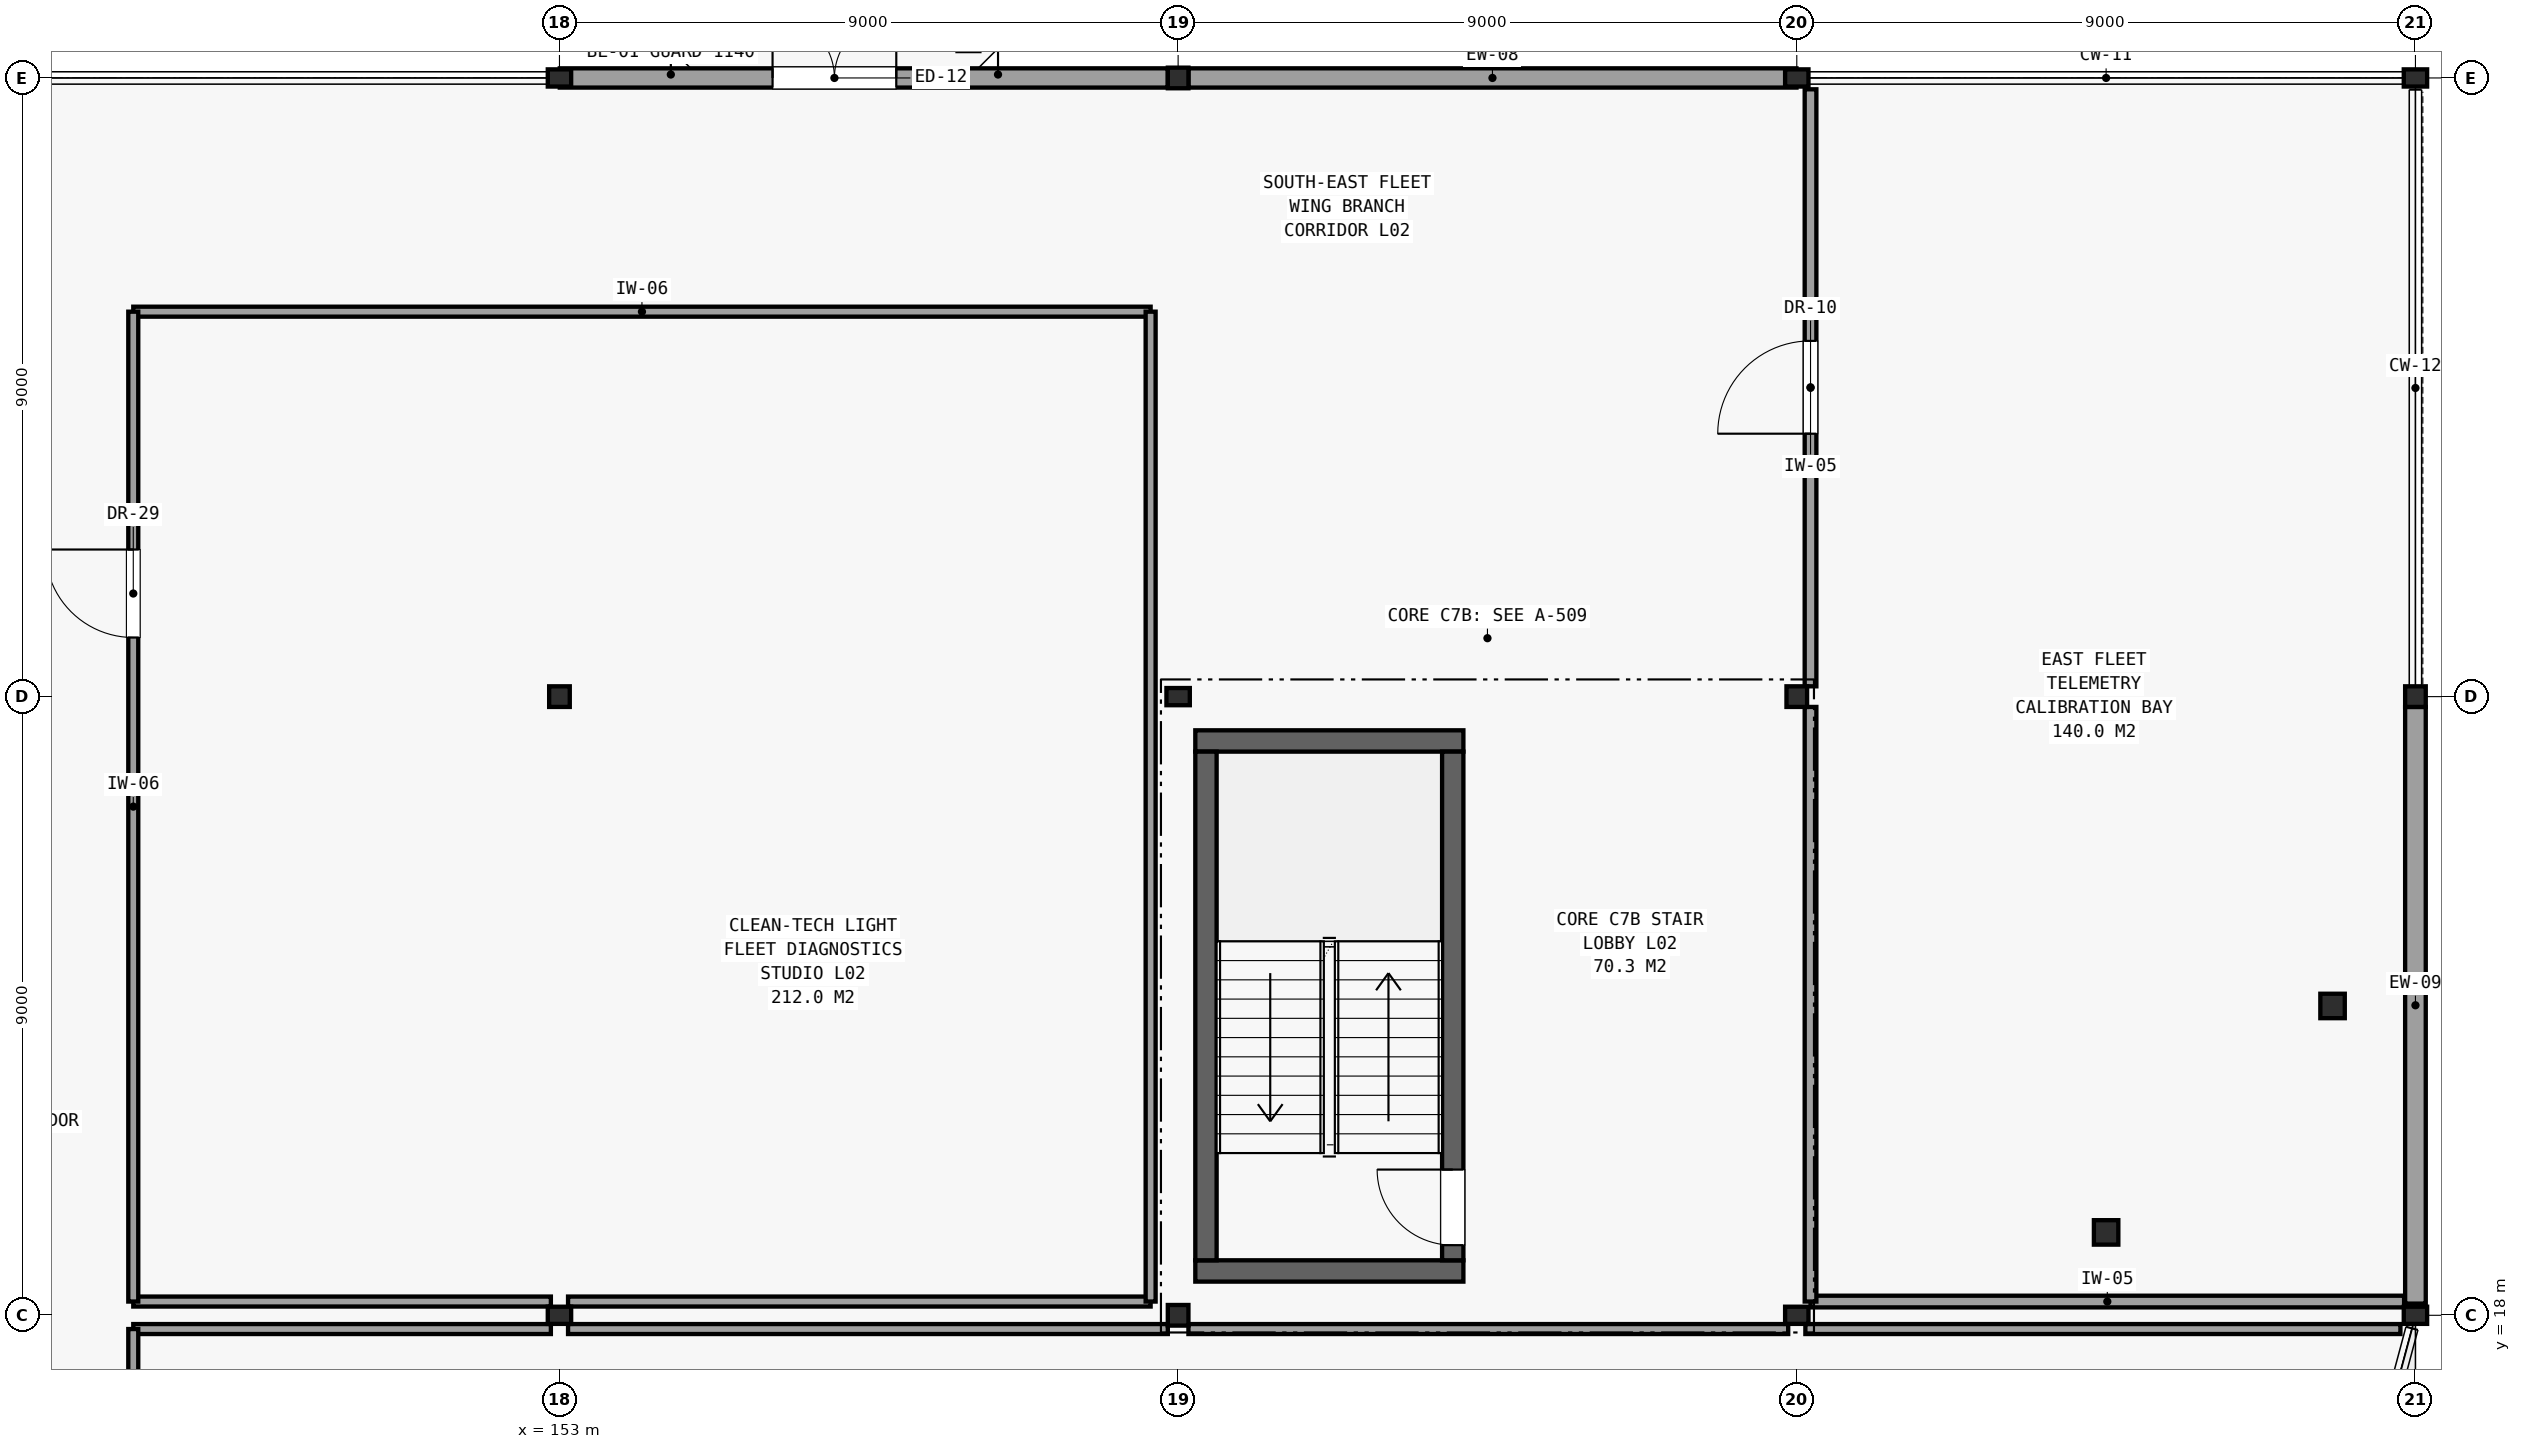
"""IFC4 building model, lengths in metres.
Left out: names, types, materials, properties, quantities, classifications, styles, units other than length and angle.
Written with IfcOpenShell. Run it as: python <this file> out.ifc"""

import sys

from ifc_helpers import new_model, si_unit, direction, frame, frame_2d, origin, origin_2d, place, context, subcontext, project, spatial, rectangle, hollow_rectangle, hollow_circle, i_section, extrude, element, fill, save


model = new_model("IFC4")
c1 = context("Model", 3, precision=1e-05, world=origin(), true_north=direction((0.0, 1.0)))
c2 = subcontext(c1, "Body", "Model", "MODEL_VIEW")
j1 = project(units=[si_unit("LENGTHUNIT", "METRE"), si_unit("PLANEANGLEUNIT", "RADIAN")], contexts=[c1])
p1 = place(None, origin())
s1 = spatial("IfcSite", under=j1, at=p1, CompositionType="ELEMENT")
p2 = place(p1, origin())
s2 = spatial("IfcBuilding", under=s1, at=p2, CompositionType="ELEMENT")
p3 = place(p2, frame((0.0, 0.0, 9.3)))
s3 = spatial("IfcBuildingStorey", under=s2, at=p3, CompositionType="ELEMENT", Elevation=9.3)
p4 = place(p3, frame((153.0, 18.0, 0.0), z_axis=(0.0, 0.0, 1.0), x_axis=(1.0, 0.0, 0.0)))
e1 = element("IfcColumn", 1, at=p4, inside=s3, PredefinedType="COLUMN", context=c2, shape_type="SweptSolid", body=[
    extrude(i_section(OverallWidth=0.25, OverallDepth=0.34, WebThickness=0.009, FlangeThickness=0.014, FilletRadius=0.01, at=origin_2d()), origin(), (0.0, 0.0, 1.0), 4.2),
])
p5 = place(p3, frame((153.0, 27.0, 0.0), z_axis=(0.0, 0.0, 1.0), x_axis=(1.0, 0.0, 0.0)))
e2 = element("IfcColumn", 2, at=p5, inside=s3, PredefinedType="COLUMN", context=c2, shape_type="SweptSolid", body=[
    extrude(hollow_rectangle(XDim=0.3, YDim=0.3, WallThickness=0.012, at=origin_2d()), origin(), (0.0, 0.0, 1.0), 4.2),
])
p6 = place(p3, frame((153.0, 36.0, 0.0), z_axis=(0.0, 0.0, 1.0), x_axis=(1.0, 0.0, 0.0)))
e3 = element("IfcColumn", 3, at=p6, inside=s3, PredefinedType="COLUMN", context=c2, shape_type="SweptSolid", body=[
    extrude(i_section(OverallWidth=0.25, OverallDepth=0.34, WebThickness=0.009, FlangeThickness=0.014, FilletRadius=0.01, at=origin_2d()), origin(), (0.0, 0.0, 1.0), 4.2),
])
p7 = place(p3, frame((162.0, 18.0, 0.0), z_axis=(0.0, 0.0, 1.0), x_axis=(1.0, 0.0, 0.0)))
e4 = element("IfcColumn", 4, at=p7, inside=s3, PredefinedType="COLUMN", context=c2, shape_type="SweptSolid", body=[
    extrude(hollow_rectangle(XDim=0.3, YDim=0.3, WallThickness=0.012, at=origin_2d()), origin(), (0.0, 0.0, 1.0), 4.2),
])
p8 = place(p3, frame((162.0, 27.0, 0.0), z_axis=(0.0, 0.0, 1.0), x_axis=(1.0, 0.0, 0.0)))
e5 = element("IfcColumn", 5, at=p8, inside=s3, PredefinedType="COLUMN", context=c2, shape_type="SweptSolid", body=[
    extrude(i_section(OverallWidth=0.25, OverallDepth=0.34, WebThickness=0.009, FlangeThickness=0.014, FilletRadius=0.01, at=origin_2d()), origin(), (0.0, 0.0, 1.0), 4.2),
])
p9 = place(p3, frame((162.0, 36.0, 0.0), z_axis=(0.0, 0.0, 1.0), x_axis=(1.0, 0.0, 0.0)))
e6 = element("IfcColumn", 6, at=p9, inside=s3, PredefinedType="COLUMN", context=c2, shape_type="SweptSolid", body=[
    extrude(hollow_rectangle(XDim=0.3, YDim=0.3, WallThickness=0.012, at=origin_2d()), origin(), (0.0, 0.0, 1.0), 4.2),
])
p10 = place(p3, frame((171.0, 18.0, 0.0), z_axis=(0.0, 0.0, 1.0), x_axis=(1.0, 0.0, 0.0)))
e7 = element("IfcColumn", 7, at=p10, inside=s3, PredefinedType="COLUMN", context=c2, shape_type="SweptSolid", body=[
    extrude(i_section(OverallWidth=0.25, OverallDepth=0.34, WebThickness=0.009, FlangeThickness=0.014, FilletRadius=0.01, at=origin_2d()), origin(), (0.0, 0.0, 1.0), 4.2),
])
p11 = place(p3, frame((171.0, 27.0, 0.0), z_axis=(0.0, 0.0, 1.0), x_axis=(1.0, 0.0, 0.0)))
e8 = element("IfcColumn", 8, at=p11, inside=s3, PredefinedType="COLUMN", context=c2, shape_type="SweptSolid", body=[
    extrude(hollow_rectangle(XDim=0.3, YDim=0.3, WallThickness=0.012, at=origin_2d()), origin(), (0.0, 0.0, 1.0), 4.2),
])
p12 = place(p3, frame((171.0, 36.0, 0.0), z_axis=(0.0, 0.0, 1.0), x_axis=(1.0, 0.0, 0.0)))
e9 = element("IfcColumn", 9, at=p12, inside=s3, PredefinedType="COLUMN", context=c2, shape_type="SweptSolid", body=[
    extrude(i_section(OverallWidth=0.25, OverallDepth=0.34, WebThickness=0.009, FlangeThickness=0.014, FilletRadius=0.01, at=origin_2d()), origin(), (0.0, 0.0, 1.0), 4.2),
])
for number, where, z_axis, x_axis in (
    (10, (175.5, 19.206, 0.0), (0.0, 0.0, 1.0), (1.0, 0.0, 0.0)),
    (11, (178.794, 22.5, 0.0), (0.0, 0.0, 1.0), (1.0, 0.0, 0.0)),
):
    element("IfcColumn", number, at=place(p3, frame(where, z_axis=z_axis, x_axis=x_axis)), inside=s3, PredefinedType="COLUMN", context=c2, shape_type="SweptSolid", body=[
        extrude(hollow_circle(Radius=0.178, WallThickness=0.013, at=origin_2d()), origin(), (0.0, 0.0, 1.0), 4.2),
    ])
p13 = place(p3, frame((180.0, 18.0, 0.0), z_axis=(0.0, 0.0, 1.0), x_axis=(1.0, 0.0, 0.0)))
e12 = element("IfcColumn", 12, at=p13, inside=s3, PredefinedType="COLUMN", context=c2, shape_type="SweptSolid", body=[
    extrude(i_section(OverallWidth=0.25, OverallDepth=0.34, WebThickness=0.009, FlangeThickness=0.014, FilletRadius=0.01, at=origin_2d()), origin(), (0.0, 0.0, 1.0), 4.14),
])
p14 = place(p3, frame((180.0, 27.0, 0.0), z_axis=(0.0, 0.0, 1.0), x_axis=(1.0, 0.0, 0.0)))
e13 = element("IfcColumn", 13, at=p14, inside=s3, PredefinedType="COLUMN", context=c2, shape_type="SweptSolid", body=[
    extrude(hollow_rectangle(XDim=0.3, YDim=0.3, WallThickness=0.012, at=origin_2d()), origin(), (0.0, 0.0, 1.0), 4.2),
])
p15 = place(p3, frame((180.0, 36.0, 0.0), z_axis=(0.0, 0.0, 1.0), x_axis=(1.0, 0.0, 0.0)))
e14 = element("IfcColumn", 14, at=p15, inside=s3, PredefinedType="COLUMN", context=c2, shape_type="SweptSolid", body=[
    extrude(i_section(OverallWidth=0.25, OverallDepth=0.34, WebThickness=0.009, FlangeThickness=0.014, FilletRadius=0.01, at=origin_2d()), origin(), (0.0, 0.0, 1.0), 4.2),
])
p16 = place(p3, frame((180.0, 18.17, 0.0), z_axis=(0.0, 0.0, 1.0), x_axis=(0.0, 1.0, 0.0)))
e15 = element("IfcWall", 15, at=p16, inside=s3, PredefinedType="SOLIDWALL", context=c2, shape_type="SweptSolid", body=[
    extrude(rectangle(XDim=8.68, YDim=0.3, at=frame_2d((4.34, 0.0))), origin(), (0.0, 0.0, 1.0), 3.29),
])
p17 = place(p3, frame((170.996, 36.0, 0.0), z_axis=(0.0, 0.0, 1.0), x_axis=(-1.0, 0.0, 0.0)))
e16 = element("IfcWall", 16, at=p17, inside=s3, PredefinedType="SOLIDWALL", context=c2, shape_type="SweptSolid", body=[
    extrude(rectangle(XDim=8.846, YDim=0.28, at=frame_2d((4.423, 0.0))), origin(), (0.0, 0.0, 1.0), 3.3),
])
p18 = place(p3, frame((161.85, 36.0, 0.0), z_axis=(0.0, 0.0, 1.0), x_axis=(-1.0, 0.0, 0.0)))
e17 = element("IfcWall", 17, at=p18, inside=s3, PredefinedType="SOLIDWALL", context=c2, shape_type="SweptSolid", body=[
    extrude(rectangle(XDim=8.846, YDim=0.28, at=frame_2d((4.423, 0.0))), origin(), (0.0, 0.0, 1.0), 3.3),
])
p19 = place(p18, frame((5.75, 0.0, 0.0), z_axis=(0.0, 0.0, 1.0), x_axis=(-1.0, 0.0, 0.0)))
e18 = element("IfcOpeningElement", 18, at=p19, cuts=e17, PredefinedType="OPENING", context=c2, shape_type="SweptSolid", body=[
    extrude(rectangle(XDim=1.8, YDim=2.2, at=frame_2d((0.9, 1.1))), frame((0.0, 0.151, 0.0), z_axis=(0.0, -1.0, 0.0), x_axis=(1.0, 0.0, 0.0)), (0.0, 0.0, 1.0), 0.302),
])
for number, where, z_axis, x_axis in (
    (19, (162.25, 18.645, 0.0), (0.0, 0.0, 1.0), (1.0, 0.0, 0.0)),
    (20, (162.25, 26.355, 0.0), (0.0, 0.0, 1.0), (1.0, 0.0, 0.0)),
):
    element("IfcWall", number, at=place(p3, frame(where, z_axis=z_axis, x_axis=x_axis)), inside=s3, PredefinedType="SHEAR", context=c2, shape_type="SweptSolid", body=[
        extrude(rectangle(XDim=3.9, YDim=0.31, at=frame_2d((1.95, 0.0))), origin(), (0.0, 0.0, 1.0), 3.95),
    ])
p20 = place(p3, frame((162.405, 18.8, 0.0), z_axis=(0.0, 0.0, 1.0), x_axis=(0.0, 1.0, 0.0)))
e21 = element("IfcWall", 21, at=p20, inside=s3, PredefinedType="SHEAR", context=c2, shape_type="SweptSolid", body=[
    extrude(rectangle(XDim=7.4, YDim=0.31, at=frame_2d((3.7, 0.0))), origin(), (0.0, 0.0, 1.0), 3.95),
])
p21 = place(p3, frame((165.995, 18.8, 0.0), z_axis=(0.0, 0.0, 1.0), x_axis=(0.0, 1.0, 0.0)))
e22 = element("IfcWall", 22, at=p21, inside=s3, PredefinedType="SHEAR", context=c2, shape_type="SweptSolid", body=[
    extrude(rectangle(XDim=7.4, YDim=0.31, at=frame_2d((3.7, 0.0))), origin(), (0.0, 0.0, 1.0), 3.95),
])
p22 = place(p21, frame((0.22, 0.0, 0.0)))
e23 = element("IfcOpeningElement", 23, at=p22, cuts=e22, PredefinedType="OPENING", context=c2, shape_type="SweptSolid", body=[
    extrude(rectangle(XDim=1.1, YDim=2.15, at=frame_2d((0.55, 1.075))), frame((0.0, 0.166, 0.0), z_axis=(0.0, -1.0, 0.0), x_axis=(1.0, 0.0, 0.0)), (0.0, 0.0, 1.0), 0.332),
])
p23 = place(p3, frame((146.8, 18.2, 0.0), z_axis=(0.0, 0.0, 1.0), x_axis=(1.0, 0.0, 0.0)))
e24 = element("IfcWall", 24, at=p23, inside=s3, PredefinedType="PARTITIONING", context=c2, shape_type="SweptSolid", body=[
    extrude(rectangle(XDim=6.075, YDim=0.145, at=frame_2d((3.038, 0.0))), origin(), (0.0, 0.0, 1.0), 3.29),
])
p24 = place(p3, frame((153.125, 18.2, 0.0), z_axis=(0.0, 0.0, 1.0), x_axis=(1.0, 0.0, 0.0)))
e25 = element("IfcWall", 25, at=p24, inside=s3, PredefinedType="PARTITIONING", context=c2, shape_type="SweptSolid", body=[
    extrude(rectangle(XDim=8.475, YDim=0.145, at=frame_2d((4.238, 0.0))), origin(), (0.0, 0.0, 1.0), 3.29),
])
p25 = place(p3, frame((146.8, 32.6, 0.0), z_axis=(0.0, 0.0, 1.0), x_axis=(1.0, 0.0, 0.0)))
e26 = element("IfcWall", 26, at=p25, inside=s3, PredefinedType="PARTITIONING", context=c2, shape_type="SweptSolid", body=[
    extrude(rectangle(XDim=14.8, YDim=0.145, at=frame_2d((7.4, 0.0))), origin(), (0.0, 0.0, 1.0), 3.3),
])
p26 = place(p3, frame((146.8, 18.2, 0.0), z_axis=(0.0, 0.0, 1.0), x_axis=(0.0, 1.0, 0.0)))
e27 = element("IfcWall", 27, at=p26, inside=s3, PredefinedType="PARTITIONING", context=c2, shape_type="SweptSolid", body=[
    extrude(rectangle(XDim=14.4, YDim=0.145, at=frame_2d((7.2, 0.0))), origin(), (0.0, 0.0, 1.0), 3.34),
])
p27 = place(p26, frame((9.66, 0.0, 0.0)))
e28 = element("IfcOpeningElement", 28, at=p27, cuts=e27, PredefinedType="OPENING", context=c2, shape_type="SweptSolid", body=[
    extrude(rectangle(XDim=1.28, YDim=2.3, at=frame_2d((0.64, 1.15))), frame((0.0, 0.083, 0.0), z_axis=(0.0, -1.0, 0.0), x_axis=(1.0, 0.0, 0.0)), (0.0, 0.0, 1.0), 0.167),
])
p28 = place(p3, frame((161.6, 18.2, 0.0), z_axis=(0.0, 0.0, 1.0), x_axis=(0.0, 1.0, 0.0)))
e29 = element("IfcWall", 29, at=p28, inside=s3, PredefinedType="PARTITIONING", context=c2, shape_type="SweptSolid", body=[
    extrude(rectangle(XDim=14.4, YDim=0.145, at=frame_2d((7.2, 0.0))), origin(), (0.0, 0.0, 1.0), 3.34),
])
p29 = place(p3, frame((171.2, 18.2, 0.0), z_axis=(0.0, 0.0, 1.0), x_axis=(1.0, 0.0, 0.0)))
e30 = element("IfcWall", 30, at=p29, inside=s3, PredefinedType="PARTITIONING", context=c2, shape_type="SweptSolid", body=[
    extrude(rectangle(XDim=8.635, YDim=0.17, at=frame_2d((4.317, 0.0))), origin(), (0.0, 0.0, 1.0), 3.29),
])
p30 = place(p3, frame((171.2, 18.2, 0.0), z_axis=(0.0, 0.0, 1.0), x_axis=(0.0, 1.0, 0.0)))
e31 = element("IfcWall", 31, at=p30, inside=s3, PredefinedType="PARTITIONING", context=c2, shape_type="SweptSolid", body=[
    extrude(rectangle(XDim=8.65, YDim=0.17, at=frame_2d((4.325, 0.0))), origin(), (0.0, 0.0, 1.0), 3.29),
])
p31 = place(p3, frame((171.2, 27.15, 0.0), z_axis=(0.0, 0.0, 1.0), x_axis=(0.0, 1.0, 0.0)))
e32 = element("IfcWall", 32, at=p31, inside=s3, PredefinedType="PARTITIONING", context=c2, shape_type="SweptSolid", body=[
    extrude(rectangle(XDim=8.685, YDim=0.17, at=frame_2d((4.343, 0.0))), origin(), (0.0, 0.0, 1.0), 3.3),
])
p32 = place(p31, frame((3.675, 0.0, 0.0)))
e33 = element("IfcOpeningElement", 33, at=p32, cuts=e32, PredefinedType="OPENING", context=c2, shape_type="SweptSolid", body=[
    extrude(rectangle(XDim=1.35, YDim=2.25, at=frame_2d((0.675, 1.125))), frame((0.0, 0.096, 0.0), z_axis=(0.0, -1.0, 0.0), x_axis=(1.0, 0.0, 0.0)), (0.0, 0.0, 1.0), 0.192),
])
p33 = place(p3, frame((146.8, 17.8, 0.0), z_axis=(0.0, 0.0, 1.0), x_axis=(1.0, 0.0, 0.0)))
e34 = element("IfcWall", 34, at=p33, inside=s3, PredefinedType="PARTITIONING", context=c2, shape_type="SweptSolid", body=[
    extrude(rectangle(XDim=6.075, YDim=0.145, at=frame_2d((3.038, 0.0))), origin(), (0.0, 0.0, 1.0), 3.29),
])
for number, where, z_axis, x_axis in (
    (35, (153.125, 17.8, 0.0), (0.0, 0.0, 1.0), (1.0, 0.0, 0.0)),
    (36, (162.15, 17.8, 0.0), (0.0, 0.0, 1.0), (1.0, 0.0, 0.0)),
):
    element("IfcWall", number, at=place(p3, frame(where, z_axis=z_axis, x_axis=x_axis)), inside=s3, PredefinedType="PARTITIONING", context=c2, shape_type="SweptSolid", body=[
        extrude(rectangle(XDim=8.725, YDim=0.145, at=frame_2d((4.363, 0.0))), origin(), (0.0, 0.0, 1.0), 3.29),
    ])
p34 = place(p3, frame((171.125, 17.8, 0.0), z_axis=(0.0, 0.0, 1.0), x_axis=(1.0, 0.0, 0.0)))
e37 = element("IfcWall", 37, at=p34, inside=s3, PredefinedType="PARTITIONING", context=c2, shape_type="SweptSolid", body=[
    extrude(rectangle(XDim=8.656, YDim=0.145, at=frame_2d((4.328, 0.0))), origin(), (0.0, 0.0, 1.0), 3.29),
])
p35 = place(p3, frame((146.8, 9.165, 0.0), z_axis=(0.0, 0.0, 1.0), x_axis=(0.0, 1.0, 0.0)))
e38 = element("IfcWall", 38, at=p35, inside=s3, PredefinedType="PARTITIONING", context=c2, shape_type="SweptSolid", body=[
    extrude(rectangle(XDim=8.635, YDim=0.145, at=frame_2d((4.317, 0.0))), origin(), (0.0, 0.0, 1.0), 3.34),
])
p36 = place(p35, frame((3.625, 0.0, 0.0)))
e39 = element("IfcOpeningElement", 39, at=p36, cuts=e38, PredefinedType="OPENING", context=c2, shape_type="SweptSolid", body=[
    extrude(rectangle(XDim=1.42, YDim=2.3, at=frame_2d((0.71, 1.15))), frame((0.0, 0.083, 0.0), z_axis=(0.0, -1.0, 0.0), x_axis=(1.0, 0.0, 0.0)), (0.0, 0.0, 1.0), 0.167),
])
p37 = place(p19, origin())
e40 = element("IfcDoor", 40, at=p37, inside=s3, OperationType="SINGLE_SWING_LEFT", PredefinedType="DOOR", context=c2, shape_type="SweptSolid", body=[
    extrude(rectangle(XDim=1.8, YDim=2.2, at=frame_2d((0.9, 1.1))), frame((0.0, 0.025, 0.0), z_axis=(0.0, -1.0, 0.0), x_axis=(1.0, 0.0, 0.0)), (0.0, 0.0, 1.0), 0.05),
])
fill(e18, e40)
p38 = place(p22, origin())
e41 = element("IfcDoor", 41, at=p38, inside=s3, OperationType="SINGLE_SWING_RIGHT", PredefinedType="DOOR", context=c2, shape_type="SweptSolid", body=[
    extrude(rectangle(XDim=1.1, YDim=2.15, at=frame_2d((0.55, 1.075))), frame((0.0, 0.025, 0.0), z_axis=(0.0, -1.0, 0.0), x_axis=(1.0, 0.0, 0.0)), (0.0, 0.0, 1.0), 0.05),
])
fill(e23, e41)
p39 = place(p27, origin())
e42 = element("IfcDoor", 42, at=p39, inside=s3, OperationType="SINGLE_SWING_RIGHT", PredefinedType="DOOR", context=c2, shape_type="SweptSolid", body=[
    extrude(rectangle(XDim=1.28, YDim=2.3, at=frame_2d((0.64, 1.15))), frame((0.0, 0.025, 0.0), z_axis=(0.0, -1.0, 0.0), x_axis=(1.0, 0.0, 0.0)), (0.0, 0.0, 1.0), 0.05),
])
fill(e28, e42)
p40 = place(p32, origin())
e43 = element("IfcDoor", 43, at=p40, inside=s3, OperationType="SINGLE_SWING_LEFT", PredefinedType="DOOR", context=c2, shape_type="SweptSolid", body=[
    extrude(rectangle(XDim=1.35, YDim=2.25, at=frame_2d((0.675, 1.125))), frame((0.0, 0.025, 0.0), z_axis=(0.0, -1.0, 0.0), x_axis=(1.0, 0.0, 0.0)), (0.0, 0.0, 1.0), 0.05),
])
fill(e33, e43)
save(model, sys.argv[1])
